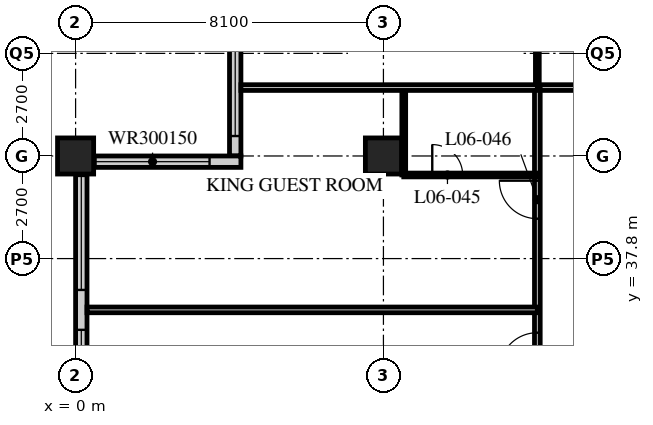
"""IFC4 building model, lengths in metres.
Left out: names, types, materials, properties, quantities, classifications, styles, units other than length and angle.
Written with IfcOpenShell. Run it as: python <this file> out.ifc"""

import sys

from ifc_helpers import new_model, si_unit, direction, frame, frame_2d, origin, origin_2d, place, context, subcontext, project, spatial, rectangle, hollow_rectangle, extrude, element, fill, save


model = new_model("IFC4")
c1 = context("Model", 3, precision=1e-05, world=origin(), true_north=direction((0.0, 1.0)))
c2 = subcontext(c1, "Body", "Model", "MODEL_VIEW")
j1 = project(units=[si_unit("LENGTHUNIT", "METRE"), si_unit("PLANEANGLEUNIT", "RADIAN")], contexts=[c1])
p1 = place(None, origin())
s1 = spatial("IfcSite", under=j1, at=p1, CompositionType="ELEMENT")
p2 = place(p1, origin())
s2 = spatial("IfcBuilding", under=s1, at=p2, CompositionType="ELEMENT")
p3 = place(p2, frame((0.0, 0.0, 33.0)))
s3 = spatial("IfcBuildingStorey", under=s2, at=p3, CompositionType="ELEMENT", Elevation=33.0)
for number, where, z_axis, x_axis in (
    (1, (0.0, 40.5, 0.0), (0.0, 0.0, 1.0), (1.0, 0.0, 0.0)),
    (2, (8.1, 40.5, 0.0), (0.0, 0.0, 1.0), (1.0, 0.0, 0.0)),
):
    element("IfcColumn", number, at=place(p3, frame(where, z_axis=z_axis, x_axis=x_axis)), inside=s3, PredefinedType="COLUMN", context=c2, shape_type="SweptSolid", body=[
        extrude(hollow_rectangle(XDim=0.95, YDim=0.95, WallThickness=0.095, at=origin_2d()), origin(), (0.0, 0.0, 1.0), 3.4),
    ])
p4 = place(p3, frame((4.2, 44.25, 0.0), z_axis=(0.0, 0.0, 1.0), x_axis=(0.0, -1.0, 0.0)))
e3 = element("IfcWall", 3, at=p4, inside=s3, PredefinedType="SOLIDWALL", context=c2, shape_type="SweptSolid", body=[
    extrude(rectangle(XDim=3.75, YDim=0.3, at=frame_2d((1.875, 0.0))), origin(), (0.0, 0.0, 1.0), 3.19),
])
p5 = place(p4, frame((0.225, 0.0, 0.9)))
e4 = element("IfcOpeningElement", 4, at=p5, cuts=e3, PredefinedType="OPENING", context=c2, shape_type="SweptSolid", body=[
    extrude(rectangle(XDim=3.0, YDim=1.5, at=frame_2d((1.5, 0.75))), frame((0.0, 0.16, 0.0), z_axis=(0.0, -1.0, 0.0), x_axis=(1.0, 0.0, 0.0)), (0.0, 0.0, 1.0), 0.32),
])
p6 = place(p3, frame((4.35, 40.35, 0.0), z_axis=(0.0, 0.0, 1.0), x_axis=(-1.0, 0.0, 0.0)))
e5 = element("IfcWall", 5, at=p6, inside=s3, PredefinedType="SOLIDWALL", context=c2, shape_type="SweptSolid", body=[
    extrude(rectangle(XDim=4.35, YDim=0.3, at=frame_2d((2.175, 0.0))), origin(), (0.0, 0.0, 1.0), 3.19),
])
p7 = place(p6, frame((0.825, 0.0, 0.9)))
e6 = element("IfcOpeningElement", 6, at=p7, cuts=e5, PredefinedType="OPENING", context=c2, shape_type="SweptSolid", body=[
    extrude(rectangle(XDim=3.0, YDim=1.5, at=frame_2d((1.5, 0.75))), frame((0.0, 0.16, 0.0), z_axis=(0.0, -1.0, 0.0), x_axis=(1.0, 0.0, 0.0)), (0.0, 0.0, 1.0), 0.32),
])
p8 = place(p3, frame((0.15, 40.2, 0.0), z_axis=(0.0, 0.0, 1.0), x_axis=(0.0, -1.0, 0.0)))
e7 = element("IfcWall", 7, at=p8, inside=s3, PredefinedType="SOLIDWALL", context=c2, shape_type="SweptSolid", body=[
    extrude(rectangle(XDim=32.1, YDim=0.3, at=frame_2d((16.05, 0.0))), origin(), (0.0, 0.0, 1.0), 3.19),
])
p9 = place(p8, frame((0.225, 0.0, 0.9)))
e8 = element("IfcOpeningElement", 8, at=p9, cuts=e7, PredefinedType="OPENING", context=c2, shape_type="SweptSolid", body=[
    extrude(rectangle(XDim=3.0, YDim=2.0, at=frame_2d((1.5, 1.0))), frame((0.0, 0.16, 0.0), z_axis=(0.0, -1.0, 0.0), x_axis=(1.0, 0.0, 0.0)), (0.0, 0.0, 1.0), 0.32),
])
p10 = place(p8, frame((4.275, 0.0, 0.9)))
e9 = element("IfcOpeningElement", 9, at=p10, cuts=e7, PredefinedType="OPENING", context=c2, shape_type="SweptSolid", body=[
    extrude(rectangle(XDim=3.0, YDim=2.0, at=frame_2d((1.5, 1.0))), frame((0.0, 0.16, 0.0), z_axis=(0.0, -1.0, 0.0), x_axis=(1.0, 0.0, 0.0)), (0.0, 0.0, 1.0), 0.32),
])
p11 = place(p8, frame((8.325, 0.0, 0.9)))
e10 = element("IfcOpeningElement", 10, at=p11, cuts=e7, PredefinedType="OPENING", context=c2, shape_type="SweptSolid", body=[
    extrude(rectangle(XDim=3.0, YDim=2.0, at=frame_2d((1.5, 1.0))), frame((0.0, 0.16, 0.0), z_axis=(0.0, -1.0, 0.0), x_axis=(1.0, 0.0, 0.0)), (0.0, 0.0, 1.0), 0.32),
])
p12 = place(p8, frame((12.375, 0.0, 0.9)))
e11 = element("IfcOpeningElement", 11, at=p12, cuts=e7, PredefinedType="OPENING", context=c2, shape_type="SweptSolid", body=[
    extrude(rectangle(XDim=3.0, YDim=2.0, at=frame_2d((1.5, 1.0))), frame((0.0, 0.16, 0.0), z_axis=(0.0, -1.0, 0.0), x_axis=(1.0, 0.0, 0.0)), (0.0, 0.0, 1.0), 0.32),
])
p13 = place(p8, frame((16.425, 0.0, 0.9)))
e12 = element("IfcOpeningElement", 12, at=p13, cuts=e7, PredefinedType="OPENING", context=c2, shape_type="SweptSolid", body=[
    extrude(rectangle(XDim=3.0, YDim=2.0, at=frame_2d((1.5, 1.0))), frame((0.0, 0.16, 0.0), z_axis=(0.0, -1.0, 0.0), x_axis=(1.0, 0.0, 0.0)), (0.0, 0.0, 1.0), 0.32),
])
p14 = place(p8, frame((20.475, 0.0, 0.9)))
e13 = element("IfcOpeningElement", 13, at=p14, cuts=e7, PredefinedType="OPENING", context=c2, shape_type="SweptSolid", body=[
    extrude(rectangle(XDim=3.0, YDim=2.0, at=frame_2d((1.5, 1.0))), frame((0.0, 0.16, 0.0), z_axis=(0.0, -1.0, 0.0), x_axis=(1.0, 0.0, 0.0)), (0.0, 0.0, 1.0), 0.32),
])
p15 = place(p8, frame((24.525, 0.0, 0.9)))
e14 = element("IfcOpeningElement", 14, at=p15, cuts=e7, PredefinedType="OPENING", context=c2, shape_type="SweptSolid", body=[
    extrude(rectangle(XDim=3.0, YDim=2.0, at=frame_2d((1.5, 1.0))), frame((0.0, 0.16, 0.0), z_axis=(0.0, -1.0, 0.0), x_axis=(1.0, 0.0, 0.0)), (0.0, 0.0, 1.0), 0.32),
])
p16 = place(p8, frame((28.575, 0.0, 0.9)))
e15 = element("IfcOpeningElement", 15, at=p16, cuts=e7, PredefinedType="OPENING", context=c2, shape_type="SweptSolid", body=[
    extrude(rectangle(XDim=3.0, YDim=2.0, at=frame_2d((1.5, 1.0))), frame((0.0, 0.16, 0.0), z_axis=(0.0, -1.0, 0.0), x_axis=(1.0, 0.0, 0.0)), (0.0, 0.0, 1.0), 0.32),
])
p17 = place(p3, frame((12.15, 42.3, 0.0), z_axis=(0.0, 0.0, 1.0), x_axis=(1.0, 0.0, 0.0)))
e16 = element("IfcWall", 16, at=p17, inside=s3, PredefinedType="PARTITIONING", context=c2, shape_type="SweptSolid", body=[
    extrude(rectangle(XDim=32.4, YDim=0.15, at=frame_2d((16.2, 0.0))), origin(), (0.0, 0.0, 1.0), 3.19),
])
p18 = place(p17, frame((6.5, 0.0, 0.0)))
e17 = element("IfcOpeningElement", 17, at=p18, cuts=e16, PredefinedType="OPENING", context=c2, shape_type="SweptSolid", body=[
    extrude(rectangle(XDim=1.0, YDim=2.1, at=frame_2d((0.5, 1.05))), frame((0.0, 0.085, 0.0), z_axis=(0.0, -1.0, 0.0), x_axis=(1.0, 0.0, 0.0)), (0.0, 0.0, 1.0), 0.17),
])
p19 = place(p17, frame((8.4, 0.0, 0.0)))
e18 = element("IfcOpeningElement", 18, at=p19, cuts=e16, PredefinedType="OPENING", context=c2, shape_type="SweptSolid", body=[
    extrude(rectangle(XDim=1.0, YDim=2.1, at=frame_2d((0.5, 1.05))), frame((0.0, 0.085, 0.0), z_axis=(0.0, -1.0, 0.0), x_axis=(1.0, 0.0, 0.0)), (0.0, 0.0, 1.0), 0.17),
])
p20 = place(p17, frame((14.6, 0.0, 0.0)))
e19 = element("IfcOpeningElement", 19, at=p20, cuts=e16, PredefinedType="OPENING", context=c2, shape_type="SweptSolid", body=[
    extrude(rectangle(XDim=1.0, YDim=2.1, at=frame_2d((0.5, 1.05))), frame((0.0, 0.085, 0.0), z_axis=(0.0, -1.0, 0.0), x_axis=(1.0, 0.0, 0.0)), (0.0, 0.0, 1.0), 0.17),
])
p21 = place(p17, frame((18.65, 0.0, 0.0)))
e20 = element("IfcOpeningElement", 20, at=p21, cuts=e16, PredefinedType="OPENING", context=c2, shape_type="SweptSolid", body=[
    extrude(rectangle(XDim=1.0, YDim=2.1, at=frame_2d((0.5, 1.05))), frame((0.0, 0.085, 0.0), z_axis=(0.0, -1.0, 0.0), x_axis=(1.0, 0.0, 0.0)), (0.0, 0.0, 1.0), 0.17),
])
p22 = place(p17, frame((23.0, 0.0, 0.0)))
e21 = element("IfcOpeningElement", 21, at=p22, cuts=e16, PredefinedType="OPENING", context=c2, shape_type="SweptSolid", body=[
    extrude(rectangle(XDim=1.0, YDim=2.1, at=frame_2d((0.5, 1.05))), frame((0.0, 0.085, 0.0), z_axis=(0.0, -1.0, 0.0), x_axis=(1.0, 0.0, 0.0)), (0.0, 0.0, 1.0), 0.17),
])
p23 = place(p17, frame((26.75, 0.0, 0.0)))
e22 = element("IfcOpeningElement", 22, at=p23, cuts=e16, PredefinedType="OPENING", context=c2, shape_type="SweptSolid", body=[
    extrude(rectangle(XDim=1.0, YDim=2.1, at=frame_2d((0.5, 1.05))), frame((0.0, 0.085, 0.0), z_axis=(0.0, -1.0, 0.0), x_axis=(1.0, 0.0, 0.0)), (0.0, 0.0, 1.0), 0.17),
])
p24 = place(p17, frame((28.775, 0.0, 0.0)))
e23 = element("IfcOpeningElement", 23, at=p24, cuts=e16, PredefinedType="OPENING", context=c2, shape_type="SweptSolid", body=[
    extrude(rectangle(XDim=1.0, YDim=2.1, at=frame_2d((0.5, 1.05))), frame((0.0, 0.085, 0.0), z_axis=(0.0, -1.0, 0.0), x_axis=(1.0, 0.0, 0.0)), (0.0, 0.0, 1.0), 0.17),
])
p25 = place(p17, frame((2.625, 0.0, 0.0)))
e24 = element("IfcOpeningElement", 24, at=p25, cuts=e16, PredefinedType="OPENING", context=c2, shape_type="SweptSolid", body=[
    extrude(rectangle(XDim=1.0, YDim=2.1, at=frame_2d((0.5, 1.05))), frame((0.0, 0.085, 0.0), z_axis=(0.0, -1.0, 0.0), x_axis=(1.0, 0.0, 0.0)), (0.0, 0.0, 1.0), 0.17),
])
p26 = place(p3, frame((12.15, 16.2, 0.0), z_axis=(0.0, 0.0, 1.0), x_axis=(0.0, 1.0, 0.0)))
e25 = element("IfcWall", 25, at=p26, inside=s3, PredefinedType="PARTITIONING", context=c2, shape_type="SweptSolid", body=[
    extrude(rectangle(XDim=26.1, YDim=0.15, at=frame_2d((13.05, 0.0))), origin(), (0.0, 0.0, 1.0), 3.19),
])
p27 = place(p26, frame((2.75, 0.0, 0.0)))
e26 = element("IfcOpeningElement", 26, at=p27, cuts=e25, PredefinedType="OPENING", context=c2, shape_type="SweptSolid", body=[
    extrude(rectangle(XDim=1.0, YDim=2.1, at=frame_2d((0.5, 1.05))), frame((0.0, 0.085, 0.0), z_axis=(0.0, -1.0, 0.0), x_axis=(1.0, 0.0, 0.0)), (0.0, 0.0, 1.0), 0.17),
])
p28 = place(p26, frame((4.35, 0.0, 0.0)))
e27 = element("IfcOpeningElement", 27, at=p28, cuts=e25, PredefinedType="OPENING", context=c2, shape_type="SweptSolid", body=[
    extrude(rectangle(XDim=1.0, YDim=2.1, at=frame_2d((0.5, 1.05))), frame((0.0, 0.085, 0.0), z_axis=(0.0, -1.0, 0.0), x_axis=(1.0, 0.0, 0.0)), (0.0, 0.0, 1.0), 0.17),
])
p29 = place(p26, frame((10.55, 0.0, 0.0)))
e28 = element("IfcOpeningElement", 28, at=p29, cuts=e25, PredefinedType="OPENING", context=c2, shape_type="SweptSolid", body=[
    extrude(rectangle(XDim=1.0, YDim=2.1, at=frame_2d((0.5, 1.05))), frame((0.0, 0.085, 0.0), z_axis=(0.0, -1.0, 0.0), x_axis=(1.0, 0.0, 0.0)), (0.0, 0.0, 1.0), 0.17),
])
p30 = place(p26, frame((12.45, 0.0, 0.0)))
e29 = element("IfcOpeningElement", 29, at=p30, cuts=e25, PredefinedType="OPENING", context=c2, shape_type="SweptSolid", body=[
    extrude(rectangle(XDim=1.0, YDim=2.1, at=frame_2d((0.5, 1.05))), frame((0.0, 0.085, 0.0), z_axis=(0.0, -1.0, 0.0), x_axis=(1.0, 0.0, 0.0)), (0.0, 0.0, 1.0), 0.17),
])
p31 = place(p26, frame((18.65, 0.0, 0.0)))
e30 = element("IfcOpeningElement", 30, at=p31, cuts=e25, PredefinedType="OPENING", context=c2, shape_type="SweptSolid", body=[
    extrude(rectangle(XDim=1.0, YDim=2.1, at=frame_2d((0.5, 1.05))), frame((0.0, 0.085, 0.0), z_axis=(0.0, -1.0, 0.0), x_axis=(1.0, 0.0, 0.0)), (0.0, 0.0, 1.0), 0.17),
])
p32 = place(p26, frame((22.65, 0.0, 0.0)))
e31 = element("IfcOpeningElement", 31, at=p32, cuts=e25, PredefinedType="OPENING", context=c2, shape_type="SweptSolid", body=[
    extrude(rectangle(XDim=1.0, YDim=2.1, at=frame_2d((0.5, 1.05))), frame((0.0, 0.085, 0.0), z_axis=(0.0, -1.0, 0.0), x_axis=(1.0, 0.0, 0.0)), (0.0, 0.0, 1.0), 0.17),
])
p33 = place(p3, frame((12.15, 36.45, 0.0), z_axis=(0.0, 0.0, 1.0), x_axis=(-1.0, 0.0, 0.0)))
e32 = element("IfcWall", 32, at=p33, inside=s3, PredefinedType="PARTITIONING", context=c2, shape_type="SweptSolid", body=[
    extrude(rectangle(XDim=11.85, YDim=0.15, at=frame_2d((5.925, 0.0))), origin(), (0.0, 0.0, 1.0), 3.19),
])
p34 = place(p3, frame((8.635, 40.0, 0.0), z_axis=(0.0, 0.0, 1.0), x_axis=(0.0, 1.0, 0.0)))
e33 = element("IfcWall", 33, at=p34, inside=s3, PredefinedType="PARTITIONING", context=c2, shape_type="SweptSolid", body=[
    extrude(rectangle(XDim=2.3, YDim=0.1, at=frame_2d((1.15, 0.0))), origin(), (0.0, 0.0, 1.0), 3.19),
])
p35 = place(p3, frame((12.15, 40.0, 0.0), z_axis=(0.0, 0.0, 1.0), x_axis=(-1.0, 0.0, 0.0)))
e34 = element("IfcWall", 34, at=p35, inside=s3, PredefinedType="PARTITIONING", context=c2, shape_type="SweptSolid", body=[
    extrude(rectangle(XDim=3.515, YDim=0.1, at=frame_2d((1.757, 0.0))), origin(), (0.0, 0.0, 1.0), 3.19),
])
p36 = place(p35, frame((1.965, 0.0, 0.0)))
e35 = element("IfcOpeningElement", 35, at=p36, cuts=e34, PredefinedType="OPENING", context=c2, shape_type="SweptSolid", body=[
    extrude(rectangle(XDim=0.8, YDim=2.1, at=frame_2d((0.4, 1.05))), frame((0.0, 0.06, 0.0), z_axis=(0.0, -1.0, 0.0), x_axis=(1.0, 0.0, 0.0)), (0.0, 0.0, 1.0), 0.12),
])
p37 = place(p3, frame((12.15, 42.3, 0.0), z_axis=(0.0, 0.0, 1.0), x_axis=(0.0, 1.0, 0.0)))
e36 = element("IfcWall", 36, at=p37, inside=s3, PredefinedType="PARTITIONING", context=c2, shape_type="SweptSolid", body=[
    extrude(rectangle(XDim=2.4, YDim=0.1, at=frame_2d((1.2, 0.0))), origin(), (0.0, 0.0, 1.0), 3.19),
])
p38 = place(p3, frame((4.35, 42.3, 0.0), z_axis=(0.0, 0.0, 1.0), x_axis=(1.0, 0.0, 0.0)))
e37 = element("IfcWall", 37, at=p38, inside=s3, PredefinedType="PARTITIONING", context=c2, shape_type="SweptSolid", body=[
    extrude(rectangle(XDim=7.8, YDim=0.15, at=frame_2d((3.9, 0.0))), origin(), (0.0, 0.0, 1.0), 3.19),
])
p39 = place(p5, origin())
e38 = element("IfcWindow", 38, at=p39, inside=s3, PartitioningType="SINGLE_PANEL", PredefinedType="WINDOW", context=c2, shape_type="SweptSolid", body=[
    extrude(rectangle(XDim=3.0, YDim=1.5, at=frame_2d((1.5, 0.75))), frame((0.0, 0.03, 0.0), z_axis=(0.0, -1.0, 0.0), x_axis=(1.0, 0.0, 0.0)), (0.0, 0.0, 1.0), 0.06),
])
fill(e4, e38)
p40 = place(p7, origin())
e39 = element("IfcWindow", 39, at=p40, inside=s3, PartitioningType="SINGLE_PANEL", PredefinedType="WINDOW", context=c2, shape_type="SweptSolid", body=[
    extrude(rectangle(XDim=3.0, YDim=1.5, at=frame_2d((1.5, 0.75))), frame((0.0, 0.03, 0.0), z_axis=(0.0, -1.0, 0.0), x_axis=(1.0, 0.0, 0.0)), (0.0, 0.0, 1.0), 0.06),
])
fill(e6, e39)
p41 = place(p9, origin())
e40 = element("IfcWindow", 40, at=p41, inside=s3, PartitioningType="SINGLE_PANEL", PredefinedType="WINDOW", context=c2, shape_type="SweptSolid", body=[
    extrude(rectangle(XDim=3.0, YDim=2.0, at=frame_2d((1.5, 1.0))), frame((0.0, 0.03, 0.0), z_axis=(0.0, -1.0, 0.0), x_axis=(1.0, 0.0, 0.0)), (0.0, 0.0, 1.0), 0.06),
])
fill(e8, e40)
p42 = place(p10, origin())
e41 = element("IfcWindow", 41, at=p42, inside=s3, PartitioningType="SINGLE_PANEL", PredefinedType="WINDOW", context=c2, shape_type="SweptSolid", body=[
    extrude(rectangle(XDim=3.0, YDim=2.0, at=frame_2d((1.5, 1.0))), frame((0.0, 0.03, 0.0), z_axis=(0.0, -1.0, 0.0), x_axis=(1.0, 0.0, 0.0)), (0.0, 0.0, 1.0), 0.06),
])
fill(e9, e41)
p43 = place(p31, origin())
e42 = element("IfcDoor", 42, at=p43, inside=s3, OperationType="SINGLE_SWING_LEFT", PredefinedType="DOOR", context=c2, shape_type="SweptSolid", body=[
    extrude(rectangle(XDim=1.0, YDim=2.1, at=frame_2d((0.5, 1.05))), frame((0.0, 0.025, 0.0), z_axis=(0.0, -1.0, 0.0), x_axis=(1.0, 0.0, 0.0)), (0.0, 0.0, 1.0), 0.05),
])
fill(e30, e42)
p44 = place(p36, origin())
e43 = element("IfcDoor", 43, at=p44, inside=s3, OperationType="SINGLE_SWING_LEFT", PredefinedType="DOOR", context=c2, shape_type="SweptSolid", body=[
    extrude(rectangle(XDim=0.8, YDim=2.1, at=frame_2d((0.4, 1.05))), frame((0.0, 0.025, 0.0), z_axis=(0.0, -1.0, 0.0), x_axis=(1.0, 0.0, 0.0)), (0.0, 0.0, 1.0), 0.05),
])
fill(e35, e43)
p45 = place(p32, origin())
e44 = element("IfcDoor", 44, at=p45, inside=s3, OperationType="SINGLE_SWING_RIGHT", PredefinedType="DOOR", context=c2, shape_type="SweptSolid", body=[
    extrude(rectangle(XDim=1.0, YDim=2.1, at=frame_2d((0.5, 1.05))), frame((0.0, 0.025, 0.0), z_axis=(0.0, -1.0, 0.0), x_axis=(1.0, 0.0, 0.0)), (0.0, 0.0, 1.0), 0.05),
])
fill(e31, e44)
save(model, sys.argv[1])
